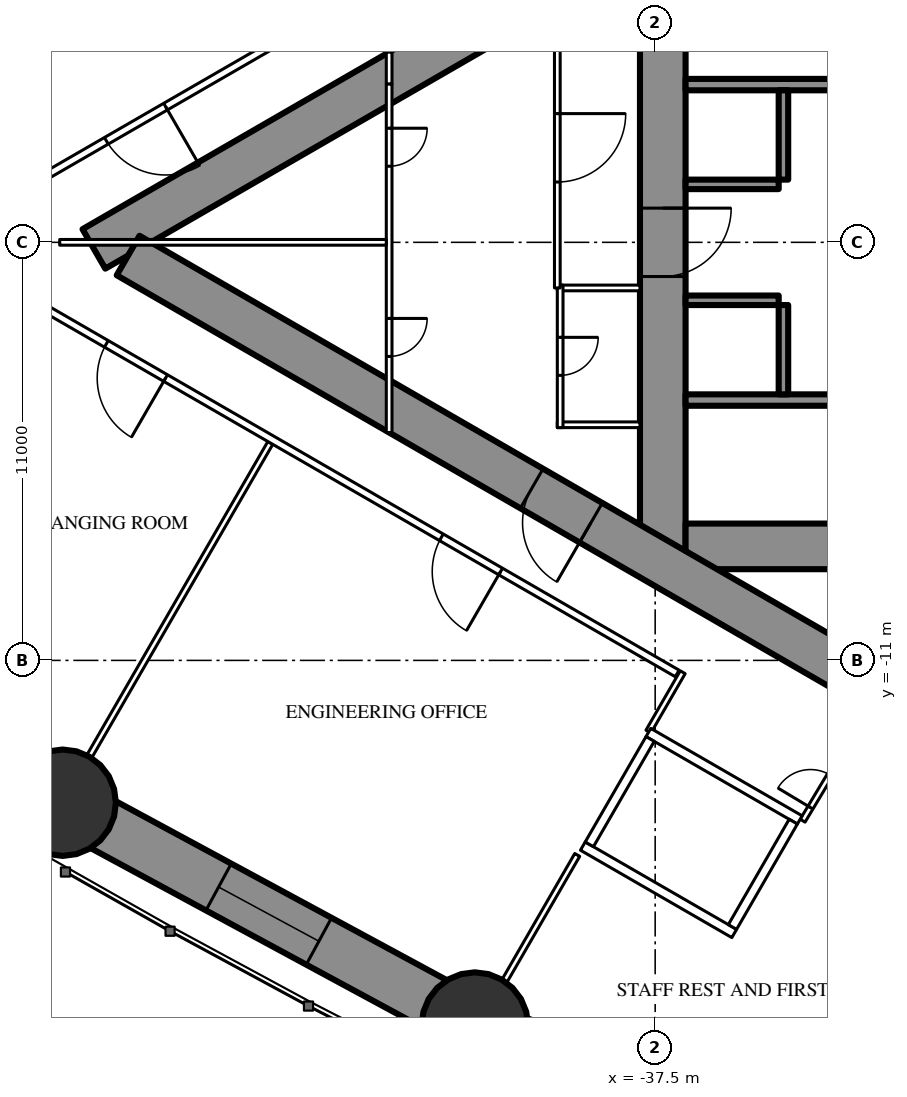
"""IFC4 building model, lengths in metres.
Left out: names, types, materials, properties, quantities, classifications, styles, units other than length and angle.
Written with IfcOpenShell. Run it as: python <this file> out.ifc"""

import sys

from ifc_helpers import new_model, si_unit, direction, frame, frame_2d, origin, origin_2d, place, context, subcontext, project, spatial, rectangle, hollow_circle, extrude, element, fill, save


model = new_model("IFC4")
c1 = context("Model", 3, precision=1e-05, world=origin(), true_north=direction((0.0, 1.0)))
c2 = subcontext(c1, "Body", "Model", "MODEL_VIEW")
j1 = project(units=[si_unit("LENGTHUNIT", "METRE"), si_unit("PLANEANGLEUNIT", "RADIAN")], contexts=[c1])
p1 = place(None, origin())
s1 = spatial("IfcSite", under=j1, at=p1, CompositionType="ELEMENT")
p2 = place(p1, origin())
s2 = spatial("IfcBuilding", under=s1, at=p2, CompositionType="ELEMENT")
p3 = place(p2, frame((0.0, 0.0, 77.5)))
s3 = spatial("IfcBuildingStorey", under=s2, at=p3, CompositionType="ELEMENT", Elevation=77.5)
for number, where, z_axis, x_axis in (
    (1, (-53.09, -14.745, 0.0), (0.0, 0.0, 1.0), (1.0, 0.0, 0.0)),
    (2, (-42.245, -20.607, 0.0), (0.0, 0.0, 1.0), (1.0, 0.0, 0.0)),
):
    element("IfcColumn", number, at=place(p3, frame(where, z_axis=z_axis, x_axis=x_axis)), inside=s3, PredefinedType="COLUMN", context=c2, shape_type="SweptSolid", body=[
        extrude(hollow_circle(Radius=1.4, WallThickness=0.12, at=origin_2d()), origin(), (0.0, 0.0, 1.0), 3.5),
    ])
p4 = place(p3, frame((-37.3, 8.6, 0.0), z_axis=(0.0, 0.0, 1.0), x_axis=(0.0, -1.0, 0.0)))
e3 = element("IfcWall", 3, at=p4, inside=s3, PredefinedType="SHEAR", context=c2, shape_type="SweptSolid", body=[
    extrude(rectangle(XDim=17.2, YDim=1.2, at=frame_2d((8.6, 0.0))), origin(), (0.0, 0.0, 1.0), 3.5),
])
p5 = place(p4, frame((7.7, 0.0, 0.0)))
e4 = element("IfcOpeningElement", 4, at=p5, cuts=e3, PredefinedType="OPENING", context=c2, shape_type="SweptSolid", body=[
    extrude(rectangle(XDim=1.8, YDim=2.2, at=frame_2d((0.9, 1.1))), frame((0.0, 0.61, 0.0), z_axis=(0.0, -1.0, 0.0), x_axis=(1.0, 0.0, 0.0)), (0.0, 0.0, 1.0), 1.22),
])
p6 = place(p3, frame((-28.3, -8.0, 0.0), z_axis=(0.0, 0.0, 1.0), x_axis=(-1.0, 0.0, 0.0)))
e5 = element("IfcWall", 5, at=p6, inside=s3, PredefinedType="SHEAR", context=c2, shape_type="SweptSolid", body=[
    extrude(rectangle(XDim=8.4, YDim=1.2, at=frame_2d((4.2, 0.0))), origin(), (0.0, 0.0, 1.0), 3.5),
])
p7 = place(p6, frame((0.25, 0.0, 0.0)))
e6 = element("IfcOpeningElement", 6, at=p7, cuts=e5, PredefinedType="OPENING", context=c2, shape_type="SweptSolid", body=[
    extrude(rectangle(XDim=1.0, YDim=2.2, at=frame_2d((0.5, 1.1))), frame((0.0, 0.61, 0.0), z_axis=(0.0, -1.0, 0.0), x_axis=(1.0, 0.0, 0.0)), (0.0, 0.0, 1.0), 1.22),
])
for number, where, z_axis, x_axis in (
    (7, (-28.3, 4.15, 0.0), (0.0, 0.0, 1.0), (-1.0, 0.0, 0.0)),
    (8, (-28.3, -4.15, 0.0), (0.0, 0.0, 1.0), (-1.0, 0.0, 0.0)),
):
    element("IfcWall", number, at=place(p3, frame(where, z_axis=z_axis, x_axis=x_axis)), inside=s3, PredefinedType="SHEAR", context=c2, shape_type="SweptSolid", body=[
        extrude(rectangle(XDim=8.4, YDim=0.3, at=frame_2d((4.2, 0.0))), origin(), (0.0, 0.0, 1.0), 3.5),
    ])
p8 = place(p3, frame((-34.125, 4.0, 0.0), z_axis=(0.0, 0.0, 1.0), x_axis=(0.0, -1.0, 0.0)))
e9 = element("IfcWall", 9, at=p8, inside=s3, PredefinedType="SHEAR", context=c2, shape_type="SweptSolid", body=[
    extrude(rectangle(XDim=2.35, YDim=0.25, at=frame_2d((1.175, 0.0))), origin(), (0.0, 0.0, 1.0), 3.5),
])
p9 = place(p3, frame((-34.25, 1.525, 0.0), z_axis=(0.0, 0.0, 1.0), x_axis=(-1.0, 0.0, 0.0)))
e10 = element("IfcWall", 10, at=p9, inside=s3, PredefinedType="SHEAR", context=c2, shape_type="SweptSolid", body=[
    extrude(rectangle(XDim=2.45, YDim=0.25, at=frame_2d((1.225, 0.0))), origin(), (0.0, 0.0, 1.0), 3.5),
])
p10 = place(p3, frame((-34.125, -1.65, 0.0), z_axis=(0.0, 0.0, 1.0), x_axis=(0.0, -1.0, 0.0)))
e11 = element("IfcWall", 11, at=p10, inside=s3, PredefinedType="SHEAR", context=c2, shape_type="SweptSolid", body=[
    extrude(rectangle(XDim=2.35, YDim=0.25, at=frame_2d((1.175, 0.0))), origin(), (0.0, 0.0, 1.0), 3.5),
])
p11 = place(p3, frame((-34.25, -1.525, 0.0), z_axis=(0.0, 0.0, 1.0), x_axis=(-1.0, 0.0, 0.0)))
e12 = element("IfcWall", 12, at=p11, inside=s3, PredefinedType="SHEAR", context=c2, shape_type="SweptSolid", body=[
    extrude(rectangle(XDim=2.45, YDim=0.25, at=frame_2d((1.225, 0.0))), origin(), (0.0, 0.0, 1.0), 3.5),
])
p12 = place(p3, frame((-27.2, 14.3, 0.0), z_axis=(0.0, 0.0, 1.0), x_axis=(-0.866026593062, -0.499997940104, 0.0)))
e13 = element("IfcWall", 13, at=p12, inside=s3, PredefinedType="SHEAR", context=c2, shape_type="SweptSolid", body=[
    extrude(rectangle(XDim=28.946, YDim=1.2, at=frame_2d((14.473, 0.0))), origin(), (0.0, 0.0, 1.0), 3.5),
])
p13 = place(p12, frame((5.85, 0.0, 0.0)))
e14 = element("IfcOpeningElement", 14, at=p13, cuts=e13, PredefinedType="OPENING", context=c2, shape_type="SweptSolid", body=[
    extrude(rectangle(XDim=1.0, YDim=2.2, at=frame_2d((0.5, 1.1))), frame((0.0, 0.61, 0.0), z_axis=(0.0, -1.0, 0.0), x_axis=(1.0, 0.0, 0.0)), (0.0, 0.0, 1.0), 1.22),
])
p14 = place(p12, frame((13.395, 0.0, 0.0)))
e15 = element("IfcOpeningElement", 15, at=p14, cuts=e13, PredefinedType="OPENING", context=c2, shape_type="SweptSolid", body=[
    extrude(rectangle(XDim=1.8, YDim=2.04, at=frame_2d((0.9, 1.02))), frame((0.0, 0.61, 0.0), z_axis=(0.0, -1.0, 0.0), x_axis=(1.0, 0.0, 0.0)), (0.0, 0.0, 1.0), 1.22),
])
p15 = place(p3, frame((-27.2, -14.3, 0.0), z_axis=(0.0, 0.0, 1.0), x_axis=(-0.866024021859, 0.500002393557, 0.0)))
e16 = element("IfcWall", 16, at=p15, inside=s3, PredefinedType="SHEAR", context=c2, shape_type="SweptSolid", body=[
    extrude(rectangle(XDim=27.907, YDim=1.2, at=frame_2d((13.954, 0.0))), origin(), (0.0, 0.0, 1.0), 3.5),
])
p16 = place(p15, frame((4.6, 0.0, 0.0)))
e17 = element("IfcOpeningElement", 17, at=p16, cuts=e16, PredefinedType="OPENING", context=c2, shape_type="SweptSolid", body=[
    extrude(rectangle(XDim=1.0, YDim=2.2, at=frame_2d((0.5, 1.1))), frame((0.0, 0.61, 0.0), z_axis=(0.0, -1.0, 0.0), x_axis=(1.0, 0.0, 0.0)), (0.0, 0.0, 1.0), 1.22),
])
p17 = place(p15, frame((13.845, 0.0, 0.0)))
e18 = element("IfcOpeningElement", 18, at=p17, cuts=e16, PredefinedType="OPENING", context=c2, shape_type="SweptSolid", body=[
    extrude(rectangle(XDim=1.8, YDim=2.2, at=frame_2d((0.9, 1.1))), frame((0.0, 0.61, 0.0), z_axis=(0.0, -1.0, 0.0), x_axis=(1.0, 0.0, 0.0)), (0.0, 0.0, 1.0), 1.22),
])
p18 = place(p3, frame((-63.572, -8.255, 0.0), z_axis=(0.0, 0.0, 1.0), x_axis=(0.850225894333, -0.526418016984, 0.0)))
e19 = element("IfcWall", 19, at=p18, inside=s3, PredefinedType="SHEAR", context=c2, shape_type="SweptSolid", body=[
    extrude(rectangle(XDim=12.328, YDim=1.4, at=frame_2d((6.164, 0.0))), origin(), (0.0, 0.0, 1.0), 3.5),
])
p19 = place(p18, frame((4.664, 0.0, 0.6)))
e20 = element("IfcOpeningElement", 20, at=p19, cuts=e19, PredefinedType="OPENING", context=c2, shape_type="SweptSolid", body=[
    extrude(rectangle(XDim=3.0, YDim=1.2, at=frame_2d((1.5, 0.6))), frame((0.0, 0.71, 0.0), z_axis=(0.0, -1.0, 0.0), x_axis=(1.0, 0.0, 0.0)), (0.0, 0.0, 1.0), 1.42),
])
p20 = place(p3, frame((-53.09, -14.745, 0.0), z_axis=(0.0, 0.0, 1.0), x_axis=(0.879692855603, -0.475542300749, 0.0)))
e21 = element("IfcWall", 21, at=p20, inside=s3, PredefinedType="SHEAR", context=c2, shape_type="SweptSolid", body=[
    extrude(rectangle(XDim=12.328, YDim=1.4, at=frame_2d((6.164, 0.0))), origin(), (0.0, 0.0, 1.0), 3.5),
])
p21 = place(p20, frame((4.664, 0.0, 0.6)))
e22 = element("IfcOpeningElement", 22, at=p21, cuts=e21, PredefinedType="OPENING", context=c2, shape_type="SweptSolid", body=[
    extrude(rectangle(XDim=3.0, YDim=1.2, at=frame_2d((1.5, 0.6))), frame((0.0, 0.71, 0.0), z_axis=(0.0, -1.0, 0.0), x_axis=(1.0, 0.0, 0.0)), (0.0, 0.0, 1.0), 1.42),
])
p22 = place(p3, frame((-42.245, -20.607, 0.0), z_axis=(0.0, 0.0, 1.0), x_axis=(0.926463236197, -0.376385270667, 0.0)))
e23 = element("IfcWall", 23, at=p22, inside=s3, PredefinedType="SHEAR", context=c2, shape_type="SweptSolid", body=[
    extrude(rectangle(XDim=13.537, YDim=1.4, at=frame_2d((6.769, 0.0))), origin(), (0.0, 0.0, 1.0), 3.5),
])
p23 = place(p22, frame((5.269, 0.0, 0.6)))
e24 = element("IfcOpeningElement", 24, at=p23, cuts=e23, PredefinedType="OPENING", context=c2, shape_type="SweptSolid", body=[
    extrude(rectangle(XDim=3.0, YDim=1.2, at=frame_2d((1.5, 0.6))), frame((0.0, 0.71, 0.0), z_axis=(0.0, -1.0, 0.0), x_axis=(1.0, 0.0, 0.0)), (0.0, 0.0, 1.0), 1.42),
])
p24 = place(p3, frame((-47.627, -5.278, 0.0), z_axis=(0.0, 0.0, 1.0), x_axis=(-0.500009844318, -0.86601972009, 0.0)))
e25 = element("IfcWall", 25, at=p24, inside=s3, PredefinedType="PARTITIONING", context=c2, shape_type="SweptSolid", body=[
    extrude(rectangle(XDim=9.51, YDim=0.15, at=frame_2d((4.755, 0.0))), origin(), (0.0, 0.0, 1.0), 2.05),
])
p25 = place(p3, frame((-39.551, -16.118, 0.0), z_axis=(0.0, 0.0, 1.0), x_axis=(-0.499986503906, -0.866033195618, 0.0)))
e26 = element("IfcWall", 26, at=p25, inside=s3, PredefinedType="PARTITIONING", context=c2, shape_type="SweptSolid", body=[
    extrude(rectangle(XDim=3.815, YDim=0.15, at=frame_2d((1.907, 0.0))), origin(), (0.0, 0.0, 1.0), 3.25),
])
p26 = place(p3, frame((-37.7, 10.894, 0.0), z_axis=(0.0, 0.0, 1.0), x_axis=(-0.866027905338, -0.499995667157, 0.0)))
e27 = element("IfcWall", 27, at=p26, inside=s3, PredefinedType="PARTITIONING", context=c2, shape_type="SweptSolid", body=[
    extrude(rectangle(XDim=21.787, YDim=0.2, at=frame_2d((10.894, 0.0))), origin(), (0.0, 0.0, 1.0), 3.25),
])
p27 = place(p26, frame((14.644, 0.0, 0.0)))
e28 = element("IfcOpeningElement", 28, at=p27, cuts=e27, PredefinedType="OPENING", context=c2, shape_type="SweptSolid", body=[
    extrude(rectangle(XDim=1.8, YDim=2.2, at=frame_2d((0.9, 1.1))), frame((0.0, 0.11, 0.0), z_axis=(0.0, -1.0, 0.0), x_axis=(1.0, 0.0, 0.0)), (0.0, 0.0, 1.0), 0.22),
])
p28 = place(p26, frame((19.958, 0.0, 0.0)))
e29 = element("IfcOpeningElement", 29, at=p28, cuts=e27, PredefinedType="OPENING", context=c2, shape_type="SweptSolid", body=[
    extrude(rectangle(XDim=1.329, YDim=2.04, at=frame_2d((0.665, 1.02))), frame((0.0, 0.11, 0.0), z_axis=(0.0, -1.0, 0.0), x_axis=(1.0, 0.0, 0.0)), (0.0, 0.0, 1.0), 0.22),
])
p29 = place(p26, frame((4.815, 0.0, 0.0)))
e30 = element("IfcOpeningElement", 30, at=p29, cuts=e27, PredefinedType="OPENING", context=c2, shape_type="SweptSolid", body=[
    extrude(rectangle(XDim=2.0, YDim=2.4, at=frame_2d((1.0, 1.2))), frame((0.0, 0.11, 0.0), z_axis=(0.0, -1.0, 0.0), x_axis=(1.0, 0.0, 0.0)), (0.0, 0.0, 1.0), 0.22),
])
p30 = place(p3, frame((-36.92, -11.344, 0.0), z_axis=(0.0, 0.0, 1.0), x_axis=(-0.866028313256, 0.499994960614, 0.0)))
e31 = element("IfcWall", 31, at=p30, inside=s3, PredefinedType="PARTITIONING", context=c2, shape_type="SweptSolid", body=[
    extrude(rectangle(XDim=22.568, YDim=0.2, at=frame_2d((11.284, 0.0))), origin(), (0.0, 0.0, 1.0), 3.25),
])
p31 = place(p30, frame((20.808, 0.0, 0.0)))
e32 = element("IfcOpeningElement", 32, at=p31, cuts=e31, PredefinedType="OPENING", context=c2, shape_type="SweptSolid", body=[
    extrude(rectangle(XDim=1.209, YDim=2.2, at=frame_2d((0.604, 1.1))), frame((0.0, 0.11, 0.0), z_axis=(0.0, -1.0, 0.0), x_axis=(1.0, 0.0, 0.0)), (0.0, 0.0, 1.0), 0.22),
])
p32 = place(p30, frame((15.544, 0.0, 0.0)))
e33 = element("IfcOpeningElement", 33, at=p32, cuts=e31, PredefinedType="OPENING", context=c2, shape_type="SweptSolid", body=[
    extrude(rectangle(XDim=1.8, YDim=2.2, at=frame_2d((0.9, 1.1))), frame((0.0, 0.11, 0.0), z_axis=(0.0, -1.0, 0.0), x_axis=(1.0, 0.0, 0.0)), (0.0, 0.0, 1.0), 0.22),
])
p33 = place(p30, frame((5.365, 0.0, 0.0)))
e34 = element("IfcOpeningElement", 34, at=p33, cuts=e31, PredefinedType="OPENING", context=c2, shape_type="SweptSolid", body=[
    extrude(rectangle(XDim=1.8, YDim=2.2, at=frame_2d((0.9, 1.1))), frame((0.0, 0.11, 0.0), z_axis=(0.0, -1.0, 0.0), x_axis=(1.0, 0.0, 0.0)), (0.0, 0.0, 1.0), 0.22),
])
p34 = place(p3, frame((-36.776, -11.312, 0.0), z_axis=(0.0, 0.0, 1.0), x_axis=(-0.500038651731, -0.866003087047, 0.0)))
e35 = element("IfcWall", 35, at=p34, inside=s3, PredefinedType="PARTITIONING", context=c2, shape_type="SweptSolid", body=[
    extrude(rectangle(XDim=1.804, YDim=0.15, at=frame_2d((0.902, 0.0))), origin(), (0.0, 0.0, 1.0), 3.25),
])
p35 = place(p3, frame((-33.621, -15.218, 0.0), z_axis=(0.0, 0.0, 1.0), x_axis=(0.514336634837, 0.857588377991, 0.0)))
e36 = element("IfcWall", 36, at=p35, inside=s3, PredefinedType="PARTITIONING", context=c2, shape_type="SweptSolid", body=[
    extrude(rectangle(XDim=1.805, YDim=0.15, at=frame_2d((0.903, 0.0))), origin(), (0.0, 0.0, 1.0), 3.25),
])
p36 = place(p35, frame((0.403, 0.0, 0.0)))
e37 = element("IfcOpeningElement", 37, at=p36, cuts=e36, PredefinedType="OPENING", context=c2, shape_type="SweptSolid", body=[
    extrude(rectangle(XDim=1.0, YDim=2.04, at=frame_2d((0.5, 1.02))), frame((0.0, 0.085, 0.0), z_axis=(0.0, -1.0, 0.0), x_axis=(1.0, 0.0, 0.0)), (0.0, 0.0, 1.0), 0.17),
])
for number, where, z_axis, x_axis in (
    (38, (-37.9, -1.2, 0.0), (0.0, 0.0, 1.0), (-1.0, 0.0, 0.0)),
    (39, (-37.9, -4.8, 0.0), (0.0, 0.0, 1.0), (-1.0, 0.0, 0.0)),
):
    element("IfcWall", number, at=place(p3, frame(where, z_axis=z_axis, x_axis=x_axis)), inside=s3, PredefinedType="PARTITIONING", context=c2, shape_type="SweptSolid", body=[
        extrude(rectangle(XDim=2.175, YDim=0.15, at=frame_2d((1.087, 0.0))), origin(), (0.0, 0.0, 1.0), 3.25),
    ])
p37 = place(p3, frame((-40.0, -1.125, 0.0), z_axis=(0.0, 0.0, 1.0), x_axis=(0.0, -1.0, 0.0)))
e40 = element("IfcWall", 40, at=p37, inside=s3, PredefinedType="PARTITIONING", context=c2, shape_type="SweptSolid", body=[
    extrude(rectangle(XDim=3.75, YDim=0.15, at=frame_2d((1.875, 0.0))), origin(), (0.0, 0.0, 1.0), 3.25),
])
p38 = place(p37, frame((1.375, 0.0, 0.0)))
e41 = element("IfcOpeningElement", 41, at=p38, cuts=e40, PredefinedType="OPENING", context=c2, shape_type="SweptSolid", body=[
    extrude(rectangle(XDim=1.0, YDim=2.2, at=frame_2d((0.5, 1.1))), frame((0.0, 0.085, 0.0), z_axis=(0.0, -1.0, 0.0), x_axis=(1.0, 0.0, 0.0)), (0.0, 0.0, 1.0), 0.17),
])
p39 = place(p3, frame((-40.075, 6.174, 0.0), z_axis=(0.0, 0.0, 1.0), x_axis=(0.0, -1.0, 0.0)))
e42 = element("IfcWall", 42, at=p39, inside=s3, PredefinedType="PARTITIONING", context=c2, shape_type="SweptSolid", body=[
    extrude(rectangle(XDim=7.374, YDim=0.15, at=frame_2d((3.687, 0.0))), origin(), (0.0, 0.0, 1.0), 3.25),
])
p40 = place(p39, frame((2.787, 0.0, 0.0)))
e43 = element("IfcOpeningElement", 43, at=p40, cuts=e42, PredefinedType="OPENING", context=c2, shape_type="SweptSolid", body=[
    extrude(rectangle(XDim=1.8, YDim=2.2, at=frame_2d((0.9, 1.1))), frame((0.0, 0.085, 0.0), z_axis=(0.0, -1.0, 0.0), x_axis=(1.0, 0.0, 0.0)), (0.0, 0.0, 1.0), 0.17),
])
p41 = place(p3, frame((-44.5, 4.169, 0.0), z_axis=(0.0, 0.0, 1.0), x_axis=(0.0, -1.0, 0.0)))
e44 = element("IfcWall", 44, at=p41, inside=s3, PredefinedType="PARTITIONING", context=c2, shape_type="SweptSolid", body=[
    extrude(rectangle(XDim=9.173, YDim=0.15, at=frame_2d((4.587, 0.0))), origin(), (0.0, 0.0, 1.0), 3.25),
])
p42 = place(p41, frame((1.167, 0.0, 0.0)))
e45 = element("IfcOpeningElement", 45, at=p42, cuts=e44, PredefinedType="OPENING", context=c2, shape_type="SweptSolid", body=[
    extrude(rectangle(XDim=1.0, YDim=2.2, at=frame_2d((0.5, 1.1))), frame((0.0, 0.085, 0.0), z_axis=(0.0, -1.0, 0.0), x_axis=(1.0, 0.0, 0.0)), (0.0, 0.0, 1.0), 0.17),
])
p43 = place(p41, frame((6.171, 0.0, 0.0)))
e46 = element("IfcOpeningElement", 46, at=p43, cuts=e44, PredefinedType="OPENING", context=c2, shape_type="SweptSolid", body=[
    extrude(rectangle(XDim=1.0, YDim=2.2, at=frame_2d((0.5, 1.1))), frame((0.0, 0.085, 0.0), z_axis=(0.0, -1.0, 0.0), x_axis=(1.0, 0.0, 0.0)), (0.0, 0.0, 1.0), 0.17),
])
p44 = place(p3, frame((-44.575, 0.0, 0.0), z_axis=(0.0, 0.0, 1.0), x_axis=(-1.0, 0.0, 0.0)))
e47 = element("IfcWall", 47, at=p44, inside=s3, PredefinedType="PARTITIONING", context=c2, shape_type="SweptSolid", body=[
    extrude(rectangle(XDim=8.593, YDim=0.15, at=frame_2d((4.297, 0.0))), origin(), (0.0, 0.0, 1.0), 2.05),
])
p45 = place(p3, frame((-33.696, -15.197, 0.0), z_axis=(0.0, 0.0, 1.0), x_axis=(-0.865976953817, 0.500083908417, 0.0)))
e48 = element("IfcWall", 48, at=p45, inside=s3, PredefinedType="PARTITIONING", context=c2, shape_type="SweptSolid", body=[
    extrude(rectangle(XDim=4.599, YDim=0.25, at=frame_2d((2.3, 0.0))), origin(), (0.0, 0.0, 1.0), 3.25),
])
p46 = place(p3, frame((-35.42, -18.186, 0.0), z_axis=(0.0, 0.0, 1.0), x_axis=(-0.865990227814, 0.50006092162, 0.0)))
e49 = element("IfcWall", 49, at=p46, inside=s3, PredefinedType="PARTITIONING", context=c2, shape_type="SweptSolid", body=[
    extrude(rectangle(XDim=4.6, YDim=0.25, at=frame_2d((2.3, 0.0))), origin(), (0.0, 0.0, 1.0), 3.25),
])
p47 = place(p3, frame((-33.866, -15.243, 0.0), z_axis=(0.0, 0.0, 1.0), x_axis=(-0.499929347863, -0.866066190972, 0.0)))
e50 = element("IfcWall", 50, at=p47, inside=s3, PredefinedType="PARTITIONING", context=c2, shape_type="SweptSolid", body=[
    extrude(rectangle(XDim=3.201, YDim=0.25, at=frame_2d((1.6, 0.0))), origin(), (0.0, 0.0, 1.0), 3.25),
])
p48 = place(p3, frame((-37.633, -13.068, 0.0), z_axis=(0.0, 0.0, 1.0), x_axis=(-0.499872130319, -0.866099216793, 0.0)))
e51 = element("IfcWall", 51, at=p48, inside=s3, PredefinedType="PARTITIONING", context=c2, shape_type="SweptSolid", body=[
    extrude(rectangle(XDim=3.2, YDim=0.25, at=frame_2d((1.6, 0.0))), origin(), (0.0, 0.0, 1.0), 3.25),
])
p49 = place(p3, frame((-44.5, 5.005, 0.0), z_axis=(0.0, 0.0, 1.0), x_axis=(0.0, -1.0, 0.0)))
e52 = element("IfcWall", 52, at=p49, inside=s3, PredefinedType="PARTITIONING", context=c2, shape_type="SweptSolid", body=[
    extrude(rectangle(XDim=0.836, YDim=0.15, at=frame_2d((0.418, 0.0))), origin(), (0.0, 0.0, 1.0), 2.05),
])
p50 = place(p21, origin())
e53 = element("IfcWindow", 53, at=p50, inside=s3, PartitioningType="SINGLE_PANEL", PredefinedType="WINDOW", context=c2, shape_type="SweptSolid", body=[
    extrude(rectangle(XDim=3.0, YDim=1.2, at=frame_2d((1.5, 0.6))), frame((0.0, 0.03, 0.0), z_axis=(0.0, -1.0, 0.0), x_axis=(1.0, 0.0, 0.0)), (0.0, 0.0, 1.0), 0.06),
])
fill(e22, e53)
p51 = place(p27, origin())
e54 = element("IfcDoor", 54, at=p51, inside=s3, OperationType="DOUBLE_DOOR_SINGLE_SWING", PredefinedType="DOOR", context=c2, shape_type="SweptSolid", body=[
    extrude(rectangle(XDim=1.8, YDim=2.2, at=frame_2d((0.9, 1.1))), frame((0.0, 0.025, 0.0), z_axis=(0.0, -1.0, 0.0), x_axis=(1.0, 0.0, 0.0)), (0.0, 0.0, 1.0), 0.05),
])
fill(e28, e54)
p52 = place(p32, origin())
e55 = element("IfcDoor", 55, at=p52, inside=s3, OperationType="DOUBLE_DOOR_SINGLE_SWING", PredefinedType="DOOR", context=c2, shape_type="SweptSolid", body=[
    extrude(rectangle(XDim=1.8, YDim=2.2, at=frame_2d((0.9, 1.1))), frame((0.0, 0.025, 0.0), z_axis=(0.0, -1.0, 0.0), x_axis=(1.0, 0.0, 0.0)), (0.0, 0.0, 1.0), 0.05),
])
fill(e33, e55)
p53 = place(p33, origin())
e56 = element("IfcDoor", 56, at=p53, inside=s3, OperationType="DOUBLE_DOOR_SINGLE_SWING", PredefinedType="DOOR", context=c2, shape_type="SweptSolid", body=[
    extrude(rectangle(XDim=1.8, YDim=2.2, at=frame_2d((0.9, 1.1))), frame((0.0, 0.025, 0.0), z_axis=(0.0, -1.0, 0.0), x_axis=(1.0, 0.0, 0.0)), (0.0, 0.0, 1.0), 0.05),
])
fill(e34, e56)
p54 = place(p36, origin())
e57 = element("IfcDoor", 57, at=p54, inside=s3, OperationType="SINGLE_SWING_LEFT", PredefinedType="DOOR", context=c2, shape_type="SweptSolid", body=[
    extrude(rectangle(XDim=1.0, YDim=2.04, at=frame_2d((0.5, 1.02))), frame((0.0, 0.025, 0.0), z_axis=(0.0, -1.0, 0.0), x_axis=(1.0, 0.0, 0.0)), (0.0, 0.0, 1.0), 0.05),
])
fill(e37, e57)
p55 = place(p38, origin())
e58 = element("IfcDoor", 58, at=p55, inside=s3, OperationType="SINGLE_SWING_LEFT", PredefinedType="DOOR", context=c2, shape_type="SweptSolid", body=[
    extrude(rectangle(XDim=1.0, YDim=2.2, at=frame_2d((0.5, 1.1))), frame((0.0, 0.025, 0.0), z_axis=(0.0, -1.0, 0.0), x_axis=(1.0, 0.0, 0.0)), (0.0, 0.0, 1.0), 0.05),
])
fill(e41, e58)
p56 = place(p40, origin())
e59 = element("IfcDoor", 59, at=p56, inside=s3, OperationType="DOUBLE_DOOR_SINGLE_SWING", PredefinedType="DOOR", context=c2, shape_type="SweptSolid", body=[
    extrude(rectangle(XDim=1.8, YDim=2.2, at=frame_2d((0.9, 1.1))), frame((0.0, 0.025, 0.0), z_axis=(0.0, -1.0, 0.0), x_axis=(1.0, 0.0, 0.0)), (0.0, 0.0, 1.0), 0.05),
])
fill(e43, e59)
p57 = place(p42, origin())
e60 = element("IfcDoor", 60, at=p57, inside=s3, OperationType="SINGLE_SWING_LEFT", PredefinedType="DOOR", context=c2, shape_type="SweptSolid", body=[
    extrude(rectangle(XDim=1.0, YDim=2.2, at=frame_2d((0.5, 1.1))), frame((0.0, 0.025, 0.0), z_axis=(0.0, -1.0, 0.0), x_axis=(1.0, 0.0, 0.0)), (0.0, 0.0, 1.0), 0.05),
])
fill(e45, e60)
p58 = place(p43, origin())
e61 = element("IfcDoor", 61, at=p58, inside=s3, OperationType="SINGLE_SWING_LEFT", PredefinedType="DOOR", context=c2, shape_type="SweptSolid", body=[
    extrude(rectangle(XDim=1.0, YDim=2.2, at=frame_2d((0.5, 1.1))), frame((0.0, 0.025, 0.0), z_axis=(0.0, -1.0, 0.0), x_axis=(1.0, 0.0, 0.0)), (0.0, 0.0, 1.0), 0.05),
])
fill(e46, e61)
p59 = place(p17, origin())
e62 = element("IfcDoor", 62, at=p59, inside=s3, OperationType="DOUBLE_DOOR_SINGLE_SWING", PredefinedType="DOOR", context=c2, shape_type="SweptSolid", body=[
    extrude(rectangle(XDim=1.8, YDim=2.2, at=frame_2d((0.9, 1.1))), frame((0.0, 0.025, 0.0), z_axis=(0.0, -1.0, 0.0), x_axis=(1.0, 0.0, 0.0)), (0.0, 0.0, 1.0), 0.05),
])
fill(e18, e62)
p60 = place(p5, origin())
e63 = element("IfcDoor", 63, at=p60, inside=s3, OperationType="DOUBLE_DOOR_SINGLE_SWING", PredefinedType="DOOR", context=c2, shape_type="SweptSolid", body=[
    extrude(rectangle(XDim=1.8, YDim=2.2, at=frame_2d((0.9, 1.1))), frame((0.0, 0.025, 0.0), z_axis=(0.0, -1.0, 0.0), x_axis=(1.0, 0.0, 0.0)), (0.0, 0.0, 1.0), 0.05),
])
fill(e4, e63)
save(model, sys.argv[1])
